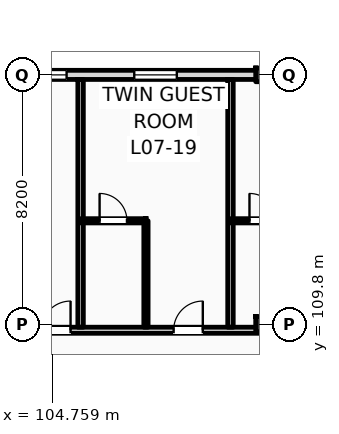
"""IFC4 building model, lengths in metres.
Left out: names, types, materials, properties, quantities, classifications, styles, units other than length and angle.
Written with IfcOpenShell. Run it as: python <this file> out.ifc"""

import sys

from ifc_helpers import new_model, si_unit, direction, frame, frame_2d, origin, origin_2d, place, context, subcontext, project, spatial, rectangle, i_section, extrude, element, fill, save


model = new_model("IFC4")
c1 = context("Model", 3, precision=1e-05, world=origin(), true_north=direction((0.0, 1.0)))
c2 = subcontext(c1, "Body", "Model", "MODEL_VIEW")
j1 = project(units=[si_unit("LENGTHUNIT", "METRE"), si_unit("PLANEANGLEUNIT", "RADIAN")], contexts=[c1])
p1 = place(None, origin())
s1 = spatial("IfcSite", under=j1, at=p1, CompositionType="ELEMENT")
p2 = place(p1, origin())
s2 = spatial("IfcBuilding", under=s1, at=p2, CompositionType="ELEMENT")
p3 = place(p2, frame((0.0, 0.0, 31.8)))
s3 = spatial("IfcBuildingStorey", under=s2, at=p3, CompositionType="ELEMENT", Elevation=31.8)
p4 = place(p3, frame((111.6, 109.8, 0.0), z_axis=(0.0, 0.0, 1.0), x_axis=(1.0, 0.0, 0.0)))
e1 = element("IfcColumn", 1, at=p4, inside=s3, PredefinedType="COLUMN", context=c2, shape_type="SweptSolid", body=[
    extrude(i_section(OverallWidth=0.3, OverallDepth=0.5, WebThickness=0.014, FlangeThickness=0.028, FilletRadius=0.027, at=origin_2d()), origin(), (0.0, 0.0, 1.0), 3.6),
])
p5 = place(p3, frame((111.6, 118.0, 0.0), z_axis=(0.0, 0.0, 1.0), x_axis=(1.0, 0.0, 0.0)))
e2 = element("IfcColumn", 2, at=p5, inside=s3, PredefinedType="COLUMN", context=c2, shape_type="SweptSolid", body=[
    extrude(i_section(OverallWidth=0.3, OverallDepth=0.45, WebThickness=0.014, FlangeThickness=0.026, FilletRadius=0.027, at=origin_2d()), origin(), (0.0, 0.0, 1.0), 3.6),
])
p6 = place(p3, frame((22.5, 118.0, 0.0), z_axis=(0.0, 0.0, 1.0), x_axis=(1.0, 0.0, 0.0)))
e3 = element("IfcWall", 3, at=p6, inside=s3, PredefinedType="STANDARD", context=c2, shape_type="SweptSolid", body=[
    extrude(rectangle(XDim=97.5, YDim=0.3, at=frame_2d((48.75, 0.0))), origin(), (0.0, 0.0, 1.0), 2.72),
])
p7 = place(p6, frame((3.61, 0.0, 0.9)))
e4 = element("IfcOpeningElement", 4, at=p7, cuts=e3, PredefinedType="OPENING", context=c2, shape_type="SweptSolid", body=[
    extrude(rectangle(XDim=1.1, YDim=1.64, at=frame_2d((0.55, 0.82))), frame((0.0, 0.16, 0.0), z_axis=(0.0, -1.0, 0.0), x_axis=(1.0, 0.0, 0.0)), (0.0, 0.0, 1.0), 0.32),
])
p8 = place(p6, frame((6.855, 0.0, 0.0)))
e5 = element("IfcOpeningElement", 5, at=p8, cuts=e3, PredefinedType="OPENING", context=c2, shape_type="SweptSolid", body=[
    extrude(rectangle(XDim=1.2, YDim=2.25, at=frame_2d((0.6, 1.125))), frame((0.0, 0.16, 0.0), z_axis=(0.0, -1.0, 0.0), x_axis=(1.0, 0.0, 0.0)), (0.0, 0.0, 1.0), 0.32),
])
p9 = place(p6, frame((11.405, 0.0, 0.9)))
e6 = element("IfcOpeningElement", 6, at=p9, cuts=e3, PredefinedType="OPENING", context=c2, shape_type="SweptSolid", body=[
    extrude(rectangle(XDim=2.1, YDim=1.64, at=frame_2d((1.05, 0.82))), frame((0.0, 0.16, 0.0), z_axis=(0.0, -1.0, 0.0), x_axis=(1.0, 0.0, 0.0)), (0.0, 0.0, 1.0), 0.32),
])
p10 = place(p6, frame((15.13, 0.0, 0.9)))
e7 = element("IfcOpeningElement", 7, at=p10, cuts=e3, PredefinedType="OPENING", context=c2, shape_type="SweptSolid", body=[
    extrude(rectangle(XDim=2.25, YDim=1.64, at=frame_2d((1.125, 0.82))), frame((0.0, 0.16, 0.0), z_axis=(0.0, -1.0, 0.0), x_axis=(1.0, 0.0, 0.0)), (0.0, 0.0, 1.0), 0.32),
])
p11 = place(p6, frame((21.53, 0.0, 0.0)))
e8 = element("IfcOpeningElement", 8, at=p11, cuts=e3, PredefinedType="OPENING", context=c2, shape_type="SweptSolid", body=[
    extrude(rectangle(XDim=1.2, YDim=2.25, at=frame_2d((0.6, 1.125))), frame((0.0, 0.16, 0.0), z_axis=(0.0, -1.0, 0.0), x_axis=(1.0, 0.0, 0.0)), (0.0, 0.0, 1.0), 0.32),
])
p12 = place(p6, frame((24.18, 0.0, 0.9)))
e9 = element("IfcOpeningElement", 9, at=p12, cuts=e3, PredefinedType="OPENING", context=c2, shape_type="SweptSolid", body=[
    extrude(rectangle(XDim=1.1, YDim=1.64, at=frame_2d((0.55, 0.82))), frame((0.0, 0.16, 0.0), z_axis=(0.0, -1.0, 0.0), x_axis=(1.0, 0.0, 0.0)), (0.0, 0.0, 1.0), 0.32),
])
p13 = place(p6, frame((29.105, 0.0, 0.9)))
e10 = element("IfcOpeningElement", 10, at=p13, cuts=e3, PredefinedType="OPENING", context=c2, shape_type="SweptSolid", body=[
    extrude(rectangle(XDim=2.7, YDim=1.64, at=frame_2d((1.35, 0.82))), frame((0.0, 0.16, 0.0), z_axis=(0.0, -1.0, 0.0), x_axis=(1.0, 0.0, 0.0)), (0.0, 0.0, 1.0), 0.32),
])
p14 = place(p6, frame((34.83, 0.0, 0.9)))
e11 = element("IfcOpeningElement", 11, at=p14, cuts=e3, PredefinedType="OPENING", context=c2, shape_type="SweptSolid", body=[
    extrude(rectangle(XDim=1.8, YDim=1.64, at=frame_2d((0.9, 0.82))), frame((0.0, 0.16, 0.0), z_axis=(0.0, -1.0, 0.0), x_axis=(1.0, 0.0, 0.0)), (0.0, 0.0, 1.0), 0.32),
])
p15 = place(p6, frame((38.525, 0.0, 0.0)))
e12 = element("IfcOpeningElement", 12, at=p15, cuts=e3, PredefinedType="OPENING", context=c2, shape_type="SweptSolid", body=[
    extrude(rectangle(XDim=1.2, YDim=2.25, at=frame_2d((0.6, 1.125))), frame((0.0, 0.16, 0.0), z_axis=(0.0, -1.0, 0.0), x_axis=(1.0, 0.0, 0.0)), (0.0, 0.0, 1.0), 0.32),
])
p16 = place(p6, frame((42.73, 0.0, 0.9)))
e13 = element("IfcOpeningElement", 13, at=p16, cuts=e3, PredefinedType="OPENING", context=c2, shape_type="SweptSolid", body=[
    extrude(rectangle(XDim=3.05, YDim=1.64, at=frame_2d((1.525, 0.82))), frame((0.0, 0.16, 0.0), z_axis=(0.0, -1.0, 0.0), x_axis=(1.0, 0.0, 0.0)), (0.0, 0.0, 1.0), 0.32),
])
p17 = place(p6, frame((47.155, 0.0, 0.9)))
e14 = element("IfcOpeningElement", 14, at=p17, cuts=e3, PredefinedType="OPENING", context=c2, shape_type="SweptSolid", body=[
    extrude(rectangle(XDim=1.35, YDim=1.64, at=frame_2d((0.675, 0.82))), frame((0.0, 0.16, 0.0), z_axis=(0.0, -1.0, 0.0), x_axis=(1.0, 0.0, 0.0)), (0.0, 0.0, 1.0), 0.32),
])
p18 = place(p6, frame((53.065, 0.0, 0.0)))
e15 = element("IfcOpeningElement", 15, at=p18, cuts=e3, PredefinedType="OPENING", context=c2, shape_type="SweptSolid", body=[
    extrude(rectangle(XDim=1.2, YDim=2.25, at=frame_2d((0.6, 1.125))), frame((0.0, 0.16, 0.0), z_axis=(0.0, -1.0, 0.0), x_axis=(1.0, 0.0, 0.0)), (0.0, 0.0, 1.0), 0.32),
])
p19 = place(p6, frame((58.2, 0.0, 0.9)))
e16 = element("IfcOpeningElement", 16, at=p19, cuts=e3, PredefinedType="OPENING", context=c2, shape_type="SweptSolid", body=[
    extrude(rectangle(XDim=1.8, YDim=1.64, at=frame_2d((0.9, 0.82))), frame((0.0, 0.16, 0.0), z_axis=(0.0, -1.0, 0.0), x_axis=(1.0, 0.0, 0.0)), (0.0, 0.0, 1.0), 0.32),
])
p20 = place(p6, frame((61.13, 0.0, 0.9)))
e17 = element("IfcOpeningElement", 17, at=p20, cuts=e3, PredefinedType="OPENING", context=c2, shape_type="SweptSolid", body=[
    extrude(rectangle(XDim=3.05, YDim=1.64, at=frame_2d((1.525, 0.82))), frame((0.0, 0.16, 0.0), z_axis=(0.0, -1.0, 0.0), x_axis=(1.0, 0.0, 0.0)), (0.0, 0.0, 1.0), 0.32),
])
p21 = place(p6, frame((67.93, 0.0, 0.0)))
e18 = element("IfcOpeningElement", 18, at=p21, cuts=e3, PredefinedType="OPENING", context=c2, shape_type="SweptSolid", body=[
    extrude(rectangle(XDim=1.2, YDim=2.25, at=frame_2d((0.6, 1.125))), frame((0.0, 0.16, 0.0), z_axis=(0.0, -1.0, 0.0), x_axis=(1.0, 0.0, 0.0)), (0.0, 0.0, 1.0), 0.32),
])
p22 = place(p6, frame((70.39, 0.0, 0.0)))
e19 = element("IfcOpeningElement", 19, at=p22, cuts=e3, PredefinedType="OPENING", context=c2, shape_type="SweptSolid", body=[
    extrude(rectangle(XDim=1.2, YDim=2.25, at=frame_2d((0.6, 1.125))), frame((0.0, 0.16, 0.0), z_axis=(0.0, -1.0, 0.0), x_axis=(1.0, 0.0, 0.0)), (0.0, 0.0, 1.0), 0.32),
])
p23 = place(p6, frame((75.905, 0.0, 0.9)))
e20 = element("IfcOpeningElement", 20, at=p23, cuts=e3, PredefinedType="OPENING", context=c2, shape_type="SweptSolid", body=[
    extrude(rectangle(XDim=1.1, YDim=1.5, at=frame_2d((0.55, 0.75))), frame((0.0, 0.16, 0.0), z_axis=(0.0, -1.0, 0.0), x_axis=(1.0, 0.0, 0.0)), (0.0, 0.0, 1.0), 0.32),
])
p24 = place(p6, frame((81.63, 0.0, 0.9)))
e21 = element("IfcOpeningElement", 21, at=p24, cuts=e3, PredefinedType="OPENING", context=c2, shape_type="SweptSolid", body=[
    extrude(rectangle(XDim=1.1, YDim=1.6, at=frame_2d((0.55, 0.8))), frame((0.0, 0.16, 0.0), z_axis=(0.0, -1.0, 0.0), x_axis=(1.0, 0.0, 0.0)), (0.0, 0.0, 1.0), 0.32),
])
p25 = place(p6, frame((84.955, 0.0, 0.9)))
e22 = element("IfcOpeningElement", 22, at=p25, cuts=e3, PredefinedType="OPENING", context=c2, shape_type="SweptSolid", body=[
    extrude(rectangle(XDim=1.4, YDim=1.64, at=frame_2d((0.7, 0.82))), frame((0.0, 0.16, 0.0), z_axis=(0.0, -1.0, 0.0), x_axis=(1.0, 0.0, 0.0)), (0.0, 0.0, 1.0), 0.32),
])
p26 = place(p6, frame((90.055, 0.0, 0.9)))
e23 = element("IfcOpeningElement", 23, at=p26, cuts=e3, PredefinedType="OPENING", context=c2, shape_type="SweptSolid", body=[
    extrude(rectangle(XDim=1.6, YDim=1.64, at=frame_2d((0.8, 0.82))), frame((0.0, 0.16, 0.0), z_axis=(0.0, -1.0, 0.0), x_axis=(1.0, 0.0, 0.0)), (0.0, 0.0, 1.0), 0.32),
])
p27 = place(p6, frame((93.87, 0.0, 0.9)))
e24 = element("IfcOpeningElement", 24, at=p27, cuts=e3, PredefinedType="OPENING", context=c2, shape_type="SweptSolid", body=[
    extrude(rectangle(XDim=1.75, YDim=1.64, at=frame_2d((0.875, 0.82))), frame((0.0, 0.16, 0.0), z_axis=(0.0, -1.0, 0.0), x_axis=(1.0, 0.0, 0.0)), (0.0, 0.0, 1.0), 0.32),
])
p28 = place(p3, frame((10.65, 109.6, 0.0), z_axis=(0.0, 0.0, 1.0), x_axis=(1.0, 0.0, 0.0)))
e25 = element("IfcWall", 25, at=p28, inside=s3, PredefinedType="PARTITIONING", context=c2, shape_type="SweptSolid", body=[
    extrude(rectangle(XDim=109.21, YDim=0.2, at=frame_2d((54.605, 0.0))), origin(), (0.0, 0.0, 1.0), 2.72),
])
p29 = place(p28, frame((15.825, 0.0, 0.0)))
e26 = element("IfcOpeningElement", 26, at=p29, cuts=e25, PredefinedType="OPENING", context=c2, shape_type="SweptSolid", body=[
    extrude(rectangle(XDim=1.02, YDim=2.2, at=frame_2d((0.51, 1.1))), frame((0.0, 0.11, 0.0), z_axis=(0.0, -1.0, 0.0), x_axis=(1.0, 0.0, 0.0)), (0.0, 0.0, 1.0), 0.22),
])
p30 = place(p28, frame((19.87, 0.0, 0.0)))
e27 = element("IfcOpeningElement", 27, at=p30, cuts=e25, PredefinedType="OPENING", context=c2, shape_type="SweptSolid", body=[
    extrude(rectangle(XDim=1.02, YDim=2.2, at=frame_2d((0.51, 1.1))), frame((0.0, 0.11, 0.0), z_axis=(0.0, -1.0, 0.0), x_axis=(1.0, 0.0, 0.0)), (0.0, 0.0, 1.0), 0.22),
])
p31 = place(p28, frame((24.47, 0.0, 0.0)))
e28 = element("IfcOpeningElement", 28, at=p31, cuts=e25, PredefinedType="OPENING", context=c2, shape_type="SweptSolid", body=[
    extrude(rectangle(XDim=1.02, YDim=2.2, at=frame_2d((0.51, 1.1))), frame((0.0, 0.11, 0.0), z_axis=(0.0, -1.0, 0.0), x_axis=(1.0, 0.0, 0.0)), (0.0, 0.0, 1.0), 0.22),
])
p32 = place(p28, frame((26.92, 0.0, 0.0)))
e29 = element("IfcOpeningElement", 29, at=p32, cuts=e25, PredefinedType="OPENING", context=c2, shape_type="SweptSolid", body=[
    extrude(rectangle(XDim=1.02, YDim=2.2, at=frame_2d((0.51, 1.1))), frame((0.0, 0.11, 0.0), z_axis=(0.0, -1.0, 0.0), x_axis=(1.0, 0.0, 0.0)), (0.0, 0.0, 1.0), 0.22),
])
p33 = place(p28, frame((33.7, 0.0, 0.0)))
e30 = element("IfcOpeningElement", 30, at=p33, cuts=e25, PredefinedType="OPENING", context=c2, shape_type="SweptSolid", body=[
    extrude(rectangle(XDim=0.96, YDim=2.2, at=frame_2d((0.48, 1.1))), frame((0.0, 0.11, 0.0), z_axis=(0.0, -1.0, 0.0), x_axis=(1.0, 0.0, 0.0)), (0.0, 0.0, 1.0), 0.22),
])
p34 = place(p28, frame((35.9, 0.0, 0.0)))
e31 = element("IfcOpeningElement", 31, at=p34, cuts=e25, PredefinedType="OPENING", context=c2, shape_type="SweptSolid", body=[
    extrude(rectangle(XDim=0.96, YDim=2.2, at=frame_2d((0.48, 1.1))), frame((0.0, 0.11, 0.0), z_axis=(0.0, -1.0, 0.0), x_axis=(1.0, 0.0, 0.0)), (0.0, 0.0, 1.0), 0.22),
])
p35 = place(p28, frame((42.9, 0.0, 0.0)))
e32 = element("IfcOpeningElement", 32, at=p35, cuts=e25, PredefinedType="OPENING", context=c2, shape_type="SweptSolid", body=[
    extrude(rectangle(XDim=0.96, YDim=2.2, at=frame_2d((0.48, 1.1))), frame((0.0, 0.11, 0.0), z_axis=(0.0, -1.0, 0.0), x_axis=(1.0, 0.0, 0.0)), (0.0, 0.0, 1.0), 0.22),
])
p36 = place(p28, frame((47.5, 0.0, 0.0)))
e33 = element("IfcOpeningElement", 33, at=p36, cuts=e25, PredefinedType="OPENING", context=c2, shape_type="SweptSolid", body=[
    extrude(rectangle(XDim=0.96, YDim=2.2, at=frame_2d((0.48, 1.1))), frame((0.0, 0.11, 0.0), z_axis=(0.0, -1.0, 0.0), x_axis=(1.0, 0.0, 0.0)), (0.0, 0.0, 1.0), 0.22),
])
p37 = place(p28, frame((49.95, 0.0, 0.0)))
e34 = element("IfcOpeningElement", 34, at=p37, cuts=e25, PredefinedType="OPENING", context=c2, shape_type="SweptSolid", body=[
    extrude(rectangle(XDim=0.96, YDim=2.2, at=frame_2d((0.48, 1.1))), frame((0.0, 0.11, 0.0), z_axis=(0.0, -1.0, 0.0), x_axis=(1.0, 0.0, 0.0)), (0.0, 0.0, 1.0), 0.22),
])
p38 = place(p28, frame((56.7, 0.0, 0.0)))
e35 = element("IfcOpeningElement", 35, at=p38, cuts=e25, PredefinedType="OPENING", context=c2, shape_type="SweptSolid", body=[
    extrude(rectangle(XDim=0.96, YDim=2.2, at=frame_2d((0.48, 1.1))), frame((0.0, 0.11, 0.0), z_axis=(0.0, -1.0, 0.0), x_axis=(1.0, 0.0, 0.0)), (0.0, 0.0, 1.0), 0.22),
])
p39 = place(p28, frame((59.15, 0.0, 0.0)))
e36 = element("IfcOpeningElement", 36, at=p39, cuts=e25, PredefinedType="OPENING", context=c2, shape_type="SweptSolid", body=[
    extrude(rectangle(XDim=0.96, YDim=2.2, at=frame_2d((0.48, 1.1))), frame((0.0, 0.11, 0.0), z_axis=(0.0, -1.0, 0.0), x_axis=(1.0, 0.0, 0.0)), (0.0, 0.0, 1.0), 0.22),
])
p40 = place(p28, frame((65.9, 0.0, 0.0)))
e37 = element("IfcOpeningElement", 37, at=p40, cuts=e25, PredefinedType="OPENING", context=c2, shape_type="SweptSolid", body=[
    extrude(rectangle(XDim=0.96, YDim=2.2, at=frame_2d((0.48, 1.1))), frame((0.0, 0.11, 0.0), z_axis=(0.0, -1.0, 0.0), x_axis=(1.0, 0.0, 0.0)), (0.0, 0.0, 1.0), 0.22),
])
p41 = place(p28, frame((70.5, 0.0, 0.0)))
e38 = element("IfcOpeningElement", 38, at=p41, cuts=e25, PredefinedType="OPENING", context=c2, shape_type="SweptSolid", body=[
    extrude(rectangle(XDim=0.96, YDim=2.2, at=frame_2d((0.48, 1.1))), frame((0.0, 0.11, 0.0), z_axis=(0.0, -1.0, 0.0), x_axis=(1.0, 0.0, 0.0)), (0.0, 0.0, 1.0), 0.22),
])
p42 = place(p28, frame((72.95, 0.0, 0.0)))
e39 = element("IfcOpeningElement", 39, at=p42, cuts=e25, PredefinedType="OPENING", context=c2, shape_type="SweptSolid", body=[
    extrude(rectangle(XDim=0.96, YDim=2.2, at=frame_2d((0.48, 1.1))), frame((0.0, 0.11, 0.0), z_axis=(0.0, -1.0, 0.0), x_axis=(1.0, 0.0, 0.0)), (0.0, 0.0, 1.0), 0.22),
])
p43 = place(p28, frame((79.7, 0.0, 0.0)))
e40 = element("IfcOpeningElement", 40, at=p43, cuts=e25, PredefinedType="OPENING", context=c2, shape_type="SweptSolid", body=[
    extrude(rectangle(XDim=0.96, YDim=2.2, at=frame_2d((0.48, 1.1))), frame((0.0, 0.11, 0.0), z_axis=(0.0, -1.0, 0.0), x_axis=(1.0, 0.0, 0.0)), (0.0, 0.0, 1.0), 0.22),
])
p44 = place(p28, frame((82.15, 0.0, 0.0)))
e41 = element("IfcOpeningElement", 41, at=p44, cuts=e25, PredefinedType="OPENING", context=c2, shape_type="SweptSolid", body=[
    extrude(rectangle(XDim=0.96, YDim=2.2, at=frame_2d((0.48, 1.1))), frame((0.0, 0.11, 0.0), z_axis=(0.0, -1.0, 0.0), x_axis=(1.0, 0.0, 0.0)), (0.0, 0.0, 1.0), 0.22),
])
p45 = place(p28, frame((88.9, 0.0, 0.0)))
e42 = element("IfcOpeningElement", 42, at=p45, cuts=e25, PredefinedType="OPENING", context=c2, shape_type="SweptSolid", body=[
    extrude(rectangle(XDim=0.96, YDim=2.2, at=frame_2d((0.48, 1.1))), frame((0.0, 0.11, 0.0), z_axis=(0.0, -1.0, 0.0), x_axis=(1.0, 0.0, 0.0)), (0.0, 0.0, 1.0), 0.22),
])
p46 = place(p28, frame((93.75, 0.0, 0.0)))
e43 = element("IfcOpeningElement", 43, at=p46, cuts=e25, PredefinedType="OPENING", context=c2, shape_type="SweptSolid", body=[
    extrude(rectangle(XDim=0.96, YDim=2.2, at=frame_2d((0.48, 1.1))), frame((0.0, 0.11, 0.0), z_axis=(0.0, -1.0, 0.0), x_axis=(1.0, 0.0, 0.0)), (0.0, 0.0, 1.0), 0.22),
])
p47 = place(p28, frame((98.1, 0.0, 0.0)))
e44 = element("IfcOpeningElement", 44, at=p47, cuts=e25, PredefinedType="OPENING", context=c2, shape_type="SweptSolid", body=[
    extrude(rectangle(XDim=0.96, YDim=2.2, at=frame_2d((0.48, 1.1))), frame((0.0, 0.11, 0.0), z_axis=(0.0, -1.0, 0.0), x_axis=(1.0, 0.0, 0.0)), (0.0, 0.0, 1.0), 0.22),
])
p48 = place(p28, frame((102.7, 0.0, 0.0)))
e45 = element("IfcOpeningElement", 45, at=p48, cuts=e25, PredefinedType="OPENING", context=c2, shape_type="SweptSolid", body=[
    extrude(rectangle(XDim=0.96, YDim=2.2, at=frame_2d((0.48, 1.1))), frame((0.0, 0.11, 0.0), z_axis=(0.0, -1.0, 0.0), x_axis=(1.0, 0.0, 0.0)), (0.0, 0.0, 1.0), 0.22),
])
p49 = place(p28, frame((105.04, 0.0, 0.0)))
e46 = element("IfcOpeningElement", 46, at=p49, cuts=e25, PredefinedType="OPENING", context=c2, shape_type="SweptSolid", body=[
    extrude(rectangle(XDim=0.96, YDim=2.2, at=frame_2d((0.48, 1.1))), frame((0.0, 0.11, 0.0), z_axis=(0.0, -1.0, 0.0), x_axis=(1.0, 0.0, 0.0)), (0.0, 0.0, 1.0), 0.22),
])
p50 = place(p28, frame((2.716, 0.0, 0.0)))
e47 = element("IfcOpeningElement", 47, at=p50, cuts=e25, PredefinedType="OPENING", context=c2, shape_type="SweptSolid", body=[
    extrude(rectangle(XDim=1.35, YDim=2.25, at=frame_2d((0.675, 1.125))), frame((0.0, 0.11, 0.0), z_axis=(0.0, -1.0, 0.0), x_axis=(1.0, 0.0, 0.0)), (0.0, 0.0, 1.0), 0.22),
])
p51 = place(p28, frame((6.65, 0.0, 0.0)))
e48 = element("IfcOpeningElement", 48, at=p51, cuts=e25, PredefinedType="OPENING", context=c2, shape_type="SweptSolid", body=[
    extrude(rectangle(XDim=1.35, YDim=2.25, at=frame_2d((0.675, 1.125))), frame((0.0, 0.11, 0.0), z_axis=(0.0, -1.0, 0.0), x_axis=(1.0, 0.0, 0.0)), (0.0, 0.0, 1.0), 0.22),
])
p52 = place(p28, frame((10.583, 0.0, 0.0)))
e49 = element("IfcOpeningElement", 49, at=p52, cuts=e25, PredefinedType="OPENING", context=c2, shape_type="SweptSolid", body=[
    extrude(rectangle(XDim=1.35, YDim=2.25, at=frame_2d((0.675, 1.125))), frame((0.0, 0.11, 0.0), z_axis=(0.0, -1.0, 0.0), x_axis=(1.0, 0.0, 0.0)), (0.0, 0.0, 1.0), 0.22),
])
for number, where, z_axis, x_axis in (
    (50, (105.69, 109.7, 0.0), (0.0, 0.0, 1.0), (0.0, 1.0, 0.0)),
    (51, (110.62, 109.7, 0.0), (0.0, 0.0, 1.0), (0.0, 1.0, 0.0)),
):
    element("IfcWall", number, at=place(p3, frame(where, z_axis=z_axis, x_axis=x_axis)), inside=s3, PredefinedType="PARTITIONING", context=c2, shape_type="SweptSolid", body=[
        extrude(rectangle(XDim=8.15, YDim=0.18, at=frame_2d((4.075, 0.0))), origin(), (0.0, 0.0, 1.0), 3.36),
    ])
p53 = place(p3, frame((107.84, 109.7, 0.0), z_axis=(0.0, 0.0, 1.0), x_axis=(0.0, 1.0, 0.0)))
e52 = element("IfcWall", 52, at=p53, inside=s3, PredefinedType="PARTITIONING", context=c2, shape_type="SweptSolid", body=[
    extrude(rectangle(XDim=3.5, YDim=0.14, at=frame_2d((1.75, 0.0))), origin(), (0.0, 0.0, 1.0), 3.36),
])
p54 = place(p3, frame((105.69, 113.2, 0.0), z_axis=(0.0, 0.0, 1.0), x_axis=(1.0, 0.0, 0.0)))
e53 = element("IfcWall", 53, at=p54, inside=s3, PredefinedType="PARTITIONING", context=c2, shape_type="SweptSolid", body=[
    extrude(rectangle(XDim=2.15, YDim=0.14, at=frame_2d((1.075, 0.0))), origin(), (0.0, 0.0, 1.0), 3.36),
])
p55 = place(p54, frame((0.625, 0.0, 0.0)))
e54 = element("IfcOpeningElement", 54, at=p55, cuts=e53, PredefinedType="OPENING", context=c2, shape_type="SweptSolid", body=[
    extrude(rectangle(XDim=0.9, YDim=2.1, at=frame_2d((0.45, 1.05))), frame((0.0, 0.08, 0.0), z_axis=(0.0, -1.0, 0.0), x_axis=(1.0, 0.0, 0.0)), (0.0, 0.0, 1.0), 0.16),
])
p56 = place(p3, frame((110.62, 113.2, 0.0), z_axis=(0.0, 0.0, 1.0), x_axis=(1.0, 0.0, 0.0)))
e55 = element("IfcWall", 55, at=p56, inside=s3, PredefinedType="PARTITIONING", context=c2, shape_type="SweptSolid", body=[
    extrude(rectangle(XDim=2.15, YDim=0.14, at=frame_2d((1.075, 0.0))), origin(), (0.0, 0.0, 1.0), 3.36),
])
p57 = place(p56, frame((0.625, 0.0, 0.0)))
e56 = element("IfcOpeningElement", 56, at=p57, cuts=e55, PredefinedType="OPENING", context=c2, shape_type="SweptSolid", body=[
    extrude(rectangle(XDim=0.9, YDim=2.1, at=frame_2d((0.45, 1.05))), frame((0.0, 0.08, 0.0), z_axis=(0.0, -1.0, 0.0), x_axis=(1.0, 0.0, 0.0)), (0.0, 0.0, 1.0), 0.16),
])
p58 = place(p24, origin())
e57 = element("IfcWindow", 57, at=p58, inside=s3, PartitioningType="DOUBLE_PANEL_VERTICAL", PredefinedType="WINDOW", context=c2, shape_type="SweptSolid", body=[
    extrude(rectangle(XDim=1.1, YDim=1.6, at=frame_2d((0.55, 0.8))), frame((0.0, 0.03, 0.0), z_axis=(0.0, -1.0, 0.0), x_axis=(1.0, 0.0, 0.0)), (0.0, 0.0, 1.0), 0.06),
])
fill(e21, e57)
p59 = place(p25, origin())
e58 = element("IfcWindow", 58, at=p59, inside=s3, PartitioningType="DOUBLE_PANEL_VERTICAL", PredefinedType="WINDOW", context=c2, shape_type="SweptSolid", body=[
    extrude(rectangle(XDim=1.4, YDim=1.64, at=frame_2d((0.7, 0.82))), frame((0.0, 0.03, 0.0), z_axis=(0.0, -1.0, 0.0), x_axis=(1.0, 0.0, 0.0)), (0.0, 0.0, 1.0), 0.06),
])
fill(e22, e58)
p60 = place(p46, origin())
e59 = element("IfcDoor", 59, at=p60, inside=s3, OperationType="SINGLE_SWING_RIGHT", PredefinedType="DOOR", context=c2, shape_type="SweptSolid", body=[
    extrude(rectangle(XDim=0.96, YDim=2.2, at=frame_2d((0.48, 1.1))), frame((0.0, 0.025, 0.0), z_axis=(0.0, -1.0, 0.0), x_axis=(1.0, 0.0, 0.0)), (0.0, 0.0, 1.0), 0.05),
])
fill(e43, e59)
p61 = place(p47, origin())
e60 = element("IfcDoor", 60, at=p61, inside=s3, OperationType="SINGLE_SWING_RIGHT", PredefinedType="DOOR", context=c2, shape_type="SweptSolid", body=[
    extrude(rectangle(XDim=0.96, YDim=2.2, at=frame_2d((0.48, 1.1))), frame((0.0, 0.025, 0.0), z_axis=(0.0, -1.0, 0.0), x_axis=(1.0, 0.0, 0.0)), (0.0, 0.0, 1.0), 0.05),
])
fill(e44, e60)
p62 = place(p55, origin())
e61 = element("IfcDoor", 61, at=p62, inside=s3, OperationType="SINGLE_SWING_LEFT", PredefinedType="DOOR", context=c2, shape_type="SweptSolid", body=[
    extrude(rectangle(XDim=0.9, YDim=2.1, at=frame_2d((0.45, 1.05))), frame((0.0, 0.025, 0.0), z_axis=(0.0, -1.0, 0.0), x_axis=(1.0, 0.0, 0.0)), (0.0, 0.0, 1.0), 0.05),
])
fill(e54, e61)
p63 = place(p57, origin())
e62 = element("IfcDoor", 62, at=p63, inside=s3, OperationType="SINGLE_SWING_LEFT", PredefinedType="DOOR", context=c2, shape_type="SweptSolid", body=[
    extrude(rectangle(XDim=0.9, YDim=2.1, at=frame_2d((0.45, 1.05))), frame((0.0, 0.025, 0.0), z_axis=(0.0, -1.0, 0.0), x_axis=(1.0, 0.0, 0.0)), (0.0, 0.0, 1.0), 0.05),
])
fill(e56, e62)
save(model, sys.argv[1])
